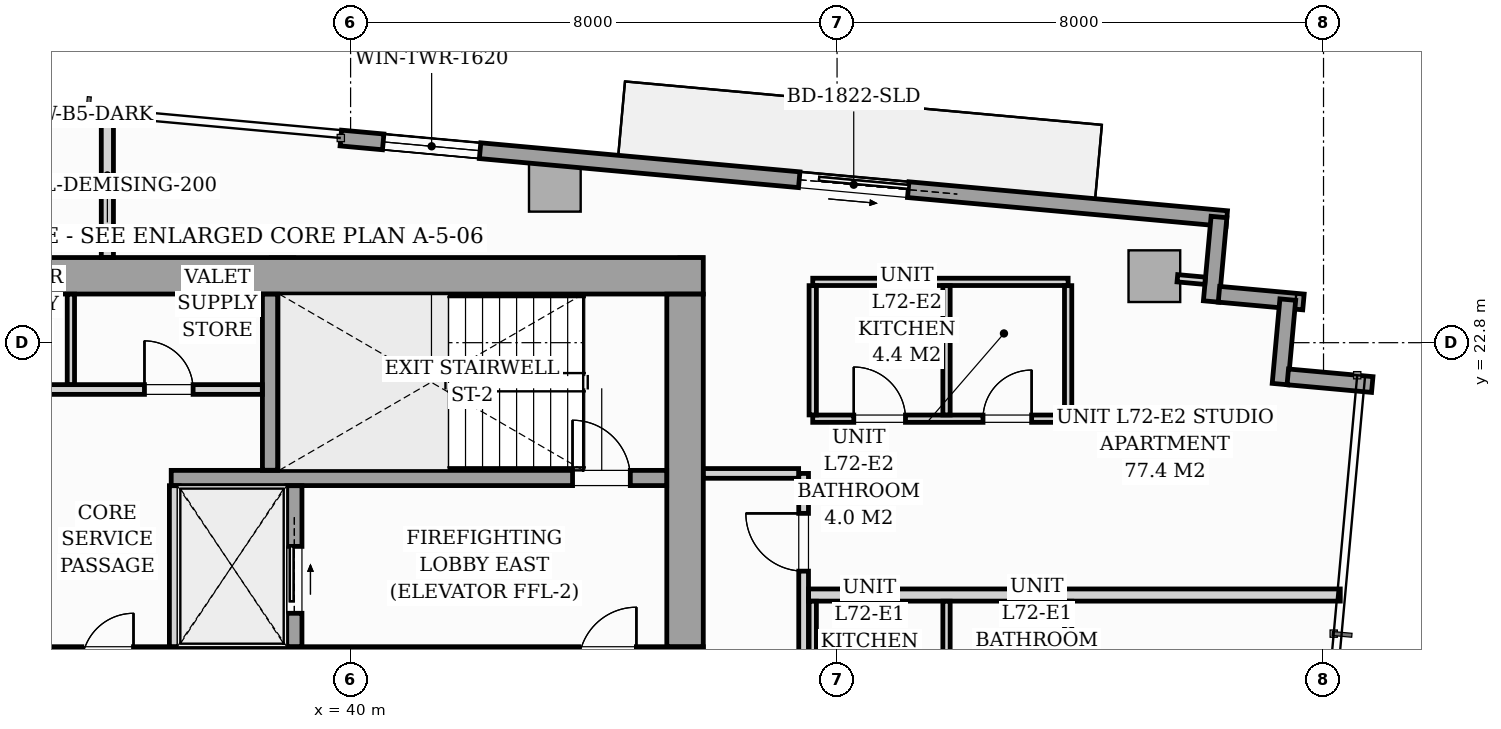
"""IFC4 building model, lengths in metres.
Left out: names, types, materials, properties, quantities, classifications, styles, units other than length and angle.
Written with IfcOpenShell. Run it as: python <this file> out.ifc"""

import sys

from ifc_helpers import new_model, si_unit, direction, frame, frame_2d, origin, origin_2d, place, context, subcontext, project, spatial, rectangle, i_section, extrude, source, transform, mapped, element, fill, save


model = new_model("IFC4")
c1 = context("Model", 3, precision=1e-05, world=origin(), true_north=direction((0.0, 1.0)))
c2 = subcontext(c1, "Body", "Model", "MODEL_VIEW")
j1 = project(units=[si_unit("LENGTHUNIT", "METRE"), si_unit("PLANEANGLEUNIT", "RADIAN")], contexts=[c1])
p1 = place(None, origin())
s1 = spatial("IfcSite", under=j1, at=p1, CompositionType="ELEMENT")
p2 = place(p1, origin())
s2 = spatial("IfcBuilding", under=s1, at=p2, CompositionType="ELEMENT")
p3 = place(p2, frame((0.0, 0.0, 249.6)))
s3 = spatial("IfcBuildingStorey", under=s2, at=p3, CompositionType="ELEMENT", Elevation=249.6)
m1 = source(origin(), c2, "Body", "SweptSolid", [
    extrude(i_section(OverallWidth=0.409, OverallDepth=0.425, WebThickness=0.033, FlangeThickness=0.052, FilletRadius=0.018, at=origin_2d()), origin(), (0.0, 0.0, 1.0), 3.296),
])
for number, where, z_axis, x_axis in (
    (1, (38.88, 24.0, 0.002), (0.0, 0.0, 1.0), (1.0, 0.0, 0.0)),
    (2, (45.6, 24.0, 0.002), (0.0, 0.0, 1.0), (1.0, 0.0, 0.0)),
):
    element("IfcColumn", number, at=place(p3, frame(where, z_axis=z_axis, x_axis=x_axis)), inside=s3, PredefinedType="PILASTER", context=c2, shape_type="MappedRepresentation", body=[
        mapped(m1, transform((0.0, 0.0, 0.0), scale=1.0)),
    ])
m2 = source(origin(), c2, "Body", "SweptSolid", [
    extrude(rectangle(XDim=0.85, YDim=0.85, at=origin_2d()), origin(), (0.0, 0.0, 1.0), 3.296),
])
for number, where, z_axis, x_axis in (
    (3, (43.359, 25.38, 0.002), (0.0, 0.0, 1.0), (0.996, -0.091, 0.0)),
    (4, (53.218, 23.894, 0.002), (0.0, 0.0, 1.0), (0.996, -0.091, 0.0)),
):
    element("IfcColumn", number, at=place(p3, frame(where, z_axis=z_axis, x_axis=x_axis)), inside=s3, PredefinedType="COLUMN", context=c2, shape_type="MappedRepresentation", body=[
        mapped(m2, transform((0.0, 0.0, 0.0), scale=1.0)),
    ])
p4 = place(p3, frame((39.839, 26.166, 0.0), z_axis=(0.0, 0.0, 1.0), x_axis=(0.995884447498, -0.090632043071, 0.0)))
e5 = element("IfcWall", 5, at=p4, inside=s3, PredefinedType="STANDARD", context=c2, shape_type="SweptSolid", body=[
    extrude(rectangle(XDim=14.63, YDim=0.26, at=frame_2d((7.315, 0.0))), origin(), (0.0, 0.0, 1.0), 3.04),
])
p5 = place(p4, frame((7.57, 0.0, 0.0)))
e6 = element("IfcOpeningElement", 6, at=p5, cuts=e5, PredefinedType="OPENING", context=c2, shape_type="SweptSolid", body=[
    extrude(rectangle(XDim=1.8, YDim=2.06, at=frame_2d((0.9, 1.03))), frame((0.0, 0.14, 0.0), z_axis=(0.0, -1.0, 0.0), x_axis=(1.0, 0.0, 0.0)), (0.0, 0.0, 1.0), 0.28),
])
p6 = place(p4, frame((0.7, 0.0, 0.65)))
e7 = element("IfcOpeningElement", 7, at=p6, cuts=e5, PredefinedType="OPENING", context=c2, shape_type="SweptSolid", body=[
    extrude(rectangle(XDim=1.6, YDim=1.5, at=frame_2d((0.8, 0.75))), frame((0.0, 0.14, 0.0), z_axis=(0.0, -1.0, 0.0), x_axis=(1.0, 0.0, 0.0)), (0.0, 0.0, 1.0), 0.28),
])
p7 = place(p3, frame((54.281, 24.866, 0.0), z_axis=(0.0, 0.0, 1.0), x_axis=(-0.090661991521, -0.995881721538, 0.0)))
e8 = element("IfcWall", 8, at=p7, inside=s3, PredefinedType="STANDARD", context=c2, shape_type="SweptSolid", body=[
    extrude(rectangle(XDim=1.395, YDim=0.26, at=frame_2d((0.698, 0.0))), origin(), (0.0, 0.0, 1.0), 3.04),
])
for number, where, z_axis, x_axis in (
    (9, (54.281, 23.596, 0.0), (0.0, 0.0, 1.0), (0.996, -0.091, 0.0)),
    (10, (55.412, 23.508, 0.0), (0.0, 0.0, 1.0), (-0.091, -0.996, 0.0)),
    (11, (55.412, 22.238, 0.0), (0.0, 0.0, 1.0), (0.996, -0.091, 0.0)),
):
    element("IfcWall", number, at=place(p3, frame(where, z_axis=z_axis, x_axis=x_axis)), inside=s3, PredefinedType="STANDARD", context=c2, shape_type="SweptSolid", body=[
        extrude(rectangle(XDim=1.395, YDim=0.26, at=frame_2d((0.698, 0.0))), origin(), (0.0, 0.0, 1.0), 3.04),
    ])
p8 = place(p3, frame((26.2, 17.5, 0.0), z_axis=(0.0, 0.0, 1.0), x_axis=(1.0, 0.0, 0.0)))
e12 = element("IfcWall", 12, at=p8, inside=s3, PredefinedType="SHEAR", context=c2, shape_type="SweptSolid", body=[
    extrude(rectangle(XDim=19.6, YDim=0.6, at=frame_2d((9.8, 0.0))), origin(), (0.0, 0.0, 1.0), 3.3),
])
p9 = place(p8, frame((0.95, 0.0, 0.0)))
e13 = element("IfcOpeningElement", 13, at=p9, cuts=e12, PredefinedType="OPENING", context=c2, shape_type="SweptSolid", body=[
    extrude(rectangle(XDim=0.95, YDim=2.06, at=frame_2d((0.475, 1.03))), frame((0.0, 0.31, 0.0), z_axis=(0.0, -1.0, 0.0), x_axis=(1.0, 0.0, 0.0)), (0.0, 0.0, 1.0), 0.62),
])
p10 = place(p8, frame((9.38, 0.0, 0.0)))
e14 = element("IfcOpeningElement", 14, at=p10, cuts=e12, PredefinedType="OPENING", context=c2, shape_type="SweptSolid", body=[
    extrude(rectangle(XDim=0.85, YDim=2.0, at=frame_2d((0.425, 1.0))), frame((0.0, 0.31, 0.0), z_axis=(0.0, -1.0, 0.0), x_axis=(1.0, 0.0, 0.0)), (0.0, 0.0, 1.0), 0.62),
])
p11 = place(p8, frame((17.55, 0.0, 0.0)))
e15 = element("IfcOpeningElement", 15, at=p11, cuts=e12, PredefinedType="OPENING", context=c2, shape_type="SweptSolid", body=[
    extrude(rectangle(XDim=0.95, YDim=2.06, at=frame_2d((0.475, 1.03))), frame((0.0, 0.31, 0.0), z_axis=(0.0, -1.0, 0.0), x_axis=(1.0, 0.0, 0.0)), (0.0, 0.0, 1.0), 0.62),
])
p12 = place(p3, frame((26.2, 23.9, 0.0), z_axis=(0.0, 0.0, 1.0), x_axis=(1.0, 0.0, 0.0)))
e16 = element("IfcWall", 16, at=p12, inside=s3, PredefinedType="SHEAR", context=c2, shape_type="SweptSolid", body=[
    extrude(rectangle(XDim=19.6, YDim=0.6, at=frame_2d((9.8, 0.0))), origin(), (0.0, 0.0, 1.0), 3.3),
])
p13 = place(p3, frame((45.5, 17.802, 0.0), z_axis=(0.0, 0.0, 1.0), x_axis=(0.0, 1.0, 0.0)))
e17 = element("IfcWall", 17, at=p13, inside=s3, PredefinedType="SHEAR", context=c2, shape_type="SweptSolid", body=[
    extrude(rectangle(XDim=5.796, YDim=0.6, at=frame_2d((2.898, 0.0))), origin(), (0.0, 0.0, 1.0), 3.3),
])
p14 = place(p3, frame((37.05, 20.575, 0.0), z_axis=(0.0, 0.0, 1.0), x_axis=(1.0, 0.0, 0.0)))
e18 = element("IfcWall", 18, at=p14, inside=s3, PredefinedType="SOLIDWALL", context=c2, shape_type="SweptSolid", body=[
    extrude(rectangle(XDim=8.148, YDim=0.25, at=frame_2d((4.074, 0.0))), origin(), (0.0, 0.0, 1.0), 3.3),
])
p15 = place(p14, frame((6.6, 0.0, 0.0)))
e19 = element("IfcOpeningElement", 19, at=p15, cuts=e18, PredefinedType="OPENING", context=c2, shape_type="SweptSolid", body=[
    extrude(rectangle(XDim=0.95, YDim=2.06, at=frame_2d((0.475, 1.03))), frame((0.0, 0.135, 0.0), z_axis=(0.0, -1.0, 0.0), x_axis=(1.0, 0.0, 0.0)), (0.0, 0.0, 1.0), 0.27),
])
p16 = place(p3, frame((38.675, 20.702, 0.0), z_axis=(0.0, 0.0, 1.0), x_axis=(0.0, 1.0, 0.0)))
e20 = element("IfcWall", 20, at=p16, inside=s3, PredefinedType="SOLIDWALL", context=c2, shape_type="SweptSolid", body=[
    extrude(rectangle(XDim=2.896, YDim=0.25, at=frame_2d((1.448, 0.0))), origin(), (0.0, 0.0, 1.0), 3.3),
])
p17 = place(p3, frame((37.1, 17.802, 0.0), z_axis=(0.0, 0.0, 1.0), x_axis=(0.0, 1.0, 0.0)))
e21 = element("IfcWall", 21, at=p17, inside=s3, PredefinedType="PARTITIONING", context=c2, shape_type="SweptSolid", body=[
    extrude(rectangle(XDim=2.646, YDim=0.16, at=frame_2d((1.323, 0.0))), origin(), (0.0, 0.0, 1.0), 3.04),
])
p18 = place(p3, frame((39.075, 17.802, 0.0), z_axis=(0.0, 0.0, 1.0), x_axis=(0.0, 1.0, 0.0)))
e22 = element("IfcWall", 22, at=p18, inside=s3, PredefinedType="SOLIDWALL", context=c2, shape_type="SweptSolid", body=[
    extrude(rectangle(XDim=2.646, YDim=0.25, at=frame_2d((1.323, 0.0))), origin(), (0.0, 0.0, 1.0), 3.3),
])
p19 = place(p18, frame((0.548, 0.0, 0.0)))
e23 = element("IfcOpeningElement", 23, at=p19, cuts=e22, PredefinedType="OPENING", context=c2, shape_type="SweptSolid", body=[
    extrude(rectangle(XDim=1.1, YDim=2.08, at=frame_2d((0.55, 1.04))), frame((0.0, 0.135, 0.0), z_axis=(0.0, -1.0, 0.0), x_axis=(1.0, 0.0, 0.0)), (0.0, 0.0, 1.0), 0.27),
])
p20 = place(p3, frame((33.452, 22.03, 0.0), z_axis=(0.0, 0.0, 1.0), x_axis=(1.0, 0.0, 0.0)))
e24 = element("IfcWall", 24, at=p20, inside=s3, PredefinedType="PARTITIONING", context=c2, shape_type="SweptSolid", body=[
    extrude(rectangle(XDim=5.096, YDim=0.16, at=frame_2d((2.548, 0.0))), origin(), (0.0, 0.0, 1.0), 3.04),
])
p21 = place(p20, frame((0.538, 0.0, 0.0)))
e25 = element("IfcOpeningElement", 25, at=p21, cuts=e24, PredefinedType="OPENING", context=c2, shape_type="SweptSolid", body=[
    extrude(rectangle(XDim=0.8, YDim=2.05, at=frame_2d((0.4, 1.025))), frame((0.0, 0.09, 0.0), z_axis=(0.0, -1.0, 0.0), x_axis=(1.0, 0.0, 0.0)), (0.0, 0.0, 1.0), 0.18),
])
p22 = place(p20, frame((3.158, 0.0, 0.0)))
e26 = element("IfcOpeningElement", 26, at=p22, cuts=e24, PredefinedType="OPENING", context=c2, shape_type="SweptSolid", body=[
    extrude(rectangle(XDim=0.8, YDim=2.05, at=frame_2d((0.4, 1.025))), frame((0.0, 0.09, 0.0), z_axis=(0.0, -1.0, 0.0), x_axis=(1.0, 0.0, 0.0)), (0.0, 0.0, 1.0), 0.18),
])
p23 = place(p3, frame((35.4, 22.112, 0.0), z_axis=(0.0, 0.0, 1.0), x_axis=(0.0, 1.0, 0.0)))
e27 = element("IfcWall", 27, at=p23, inside=s3, PredefinedType="PARTITIONING", context=c2, shape_type="SweptSolid", body=[
    extrude(rectangle(XDim=1.486, YDim=0.12, at=frame_2d((0.743, 0.0))), origin(), (0.0, 0.0, 1.0), 3.04),
])
p24 = place(p3, frame((47.45, 13.362, 0.0), z_axis=(0.0, 0.0, 1.0), x_axis=(0.0, 1.0, 0.0)))
e28 = element("IfcWall", 28, at=p24, inside=s3, PredefinedType="PARTITIONING", context=c2, shape_type="SweptSolid", body=[
    extrude(rectangle(XDim=7.288, YDim=0.16, at=frame_2d((3.644, 0.0))), origin(), (0.0, 0.0, 1.0), 3.04),
])
p25 = place(p24, frame((0.493, 0.0, 0.0)))
e29 = element("IfcOpeningElement", 29, at=p25, cuts=e28, PredefinedType="OPENING", context=c2, shape_type="SweptSolid", body=[
    extrude(rectangle(XDim=0.95, YDim=2.06, at=frame_2d((0.475, 1.03))), frame((0.0, 0.09, 0.0), z_axis=(0.0, -1.0, 0.0), x_axis=(1.0, 0.0, 0.0)), (0.0, 0.0, 1.0), 0.18),
])
p26 = place(p24, frame((5.681, 0.0, 0.0)))
e30 = element("IfcOpeningElement", 30, at=p26, cuts=e28, PredefinedType="OPENING", context=c2, shape_type="SweptSolid", body=[
    extrude(rectangle(XDim=0.95, YDim=2.06, at=frame_2d((0.475, 1.03))), frame((0.0, 0.09, 0.0), z_axis=(0.0, -1.0, 0.0), x_axis=(1.0, 0.0, 0.0)), (0.0, 0.0, 1.0), 0.18),
])
p27 = place(p3, frame((36.0, 24.202, 0.0), z_axis=(0.0, 0.0, 1.0), x_axis=(0.0, 1.0, 0.0)))
e31 = element("IfcWall", 31, at=p27, inside=s3, PredefinedType="PARTITIONING", context=c2, shape_type="SweptSolid", body=[
    extrude(rectangle(XDim=2.363, YDim=0.2, at=frame_2d((1.182, 0.0))), origin(), (0.0, 0.0, 1.0), 3.04),
])
p28 = place(p3, frame((45.802, 20.65, 0.0), z_axis=(0.0, 0.0, 1.0), x_axis=(1.0, 0.0, 0.0)))
e32 = element("IfcWall", 32, at=p28, inside=s3, PredefinedType="PARTITIONING", context=c2, shape_type="SweptSolid", body=[
    extrude(rectangle(XDim=1.566, YDim=0.16, at=frame_2d((0.783, 0.0))), origin(), (0.0, 0.0, 1.0), 3.04),
])
p29 = place(p3, frame((47.532, 18.65, 0.0), z_axis=(0.0, 0.0, 1.0), x_axis=(1.0, 0.0, 0.0)))
e33 = element("IfcWall", 33, at=p29, inside=s3, PredefinedType="PARTITIONING", context=c2, shape_type="SweptSolid", body=[
    extrude(rectangle(XDim=8.743, YDim=0.2, at=frame_2d((4.372, 0.0))), origin(), (0.0, 0.0, 1.0), 3.04),
])
for number, where, z_axis, x_axis in (
    (34, (47.6, 16.362, 0.0), (0.0, 0.0, 1.0), (0.0, 1.0, 0.0)),
    (35, (49.8, 16.362, 0.0), (0.0, 0.0, 1.0), (0.0, 1.0, 0.0)),
    (36, (51.8, 16.362, 0.0), (0.0, 0.0, 1.0), (0.0, 1.0, 0.0)),
):
    element("IfcWall", number, at=place(p3, frame(where, z_axis=z_axis, x_axis=x_axis)), inside=s3, PredefinedType="PARTITIONING", context=c2, shape_type="SweptSolid", body=[
        extrude(rectangle(XDim=2.186, YDim=0.12, at=frame_2d((1.093, 0.0))), origin(), (0.0, 0.0, 1.0), 3.04),
    ])
p30 = place(p3, frame((47.6, 21.55, 0.0), z_axis=(0.0, 0.0, 1.0), x_axis=(1.0, 0.0, 0.0)))
e37 = element("IfcWall", 37, at=p30, inside=s3, PredefinedType="PARTITIONING", context=c2, shape_type="SweptSolid", body=[
    extrude(rectangle(XDim=4.2, YDim=0.12, at=frame_2d((2.1, 0.0))), origin(), (0.0, 0.0, 1.0), 3.04),
])
p31 = place(p30, frame((0.675, 0.0, 0.0)))
e38 = element("IfcOpeningElement", 38, at=p31, cuts=e37, PredefinedType="OPENING", context=c2, shape_type="SweptSolid", body=[
    extrude(rectangle(XDim=0.85, YDim=2.05, at=frame_2d((0.425, 1.025))), frame((0.0, 0.07, 0.0), z_axis=(0.0, -1.0, 0.0), x_axis=(1.0, 0.0, 0.0)), (0.0, 0.0, 1.0), 0.14),
])
p32 = place(p30, frame((2.8, 0.0, 0.0)))
e39 = element("IfcOpeningElement", 39, at=p32, cuts=e37, PredefinedType="OPENING", context=c2, shape_type="SweptSolid", body=[
    extrude(rectangle(XDim=0.8, YDim=2.02, at=frame_2d((0.4, 1.01))), frame((0.0, 0.07, 0.0), z_axis=(0.0, -1.0, 0.0), x_axis=(1.0, 0.0, 0.0)), (0.0, 0.0, 1.0), 0.14),
])
p33 = place(p3, frame((47.6, 23.8, 0.0), z_axis=(0.0, 0.0, 1.0), x_axis=(1.0, 0.0, 0.0)))
e40 = element("IfcWall", 40, at=p33, inside=s3, PredefinedType="PARTITIONING", context=c2, shape_type="SweptSolid", body=[
    extrude(rectangle(XDim=4.2, YDim=0.12, at=frame_2d((2.1, 0.0))), origin(), (0.0, 0.0, 1.0), 3.04),
])
for number, where, z_axis, x_axis in (
    (41, (47.6, 21.612, 0.0), (0.0, 0.0, 1.0), (0.0, 1.0, 0.0)),
    (42, (49.8, 21.612, 0.0), (0.0, 0.0, 1.0), (0.0, 1.0, 0.0)),
    (43, (51.8, 21.612, 0.0), (0.0, 0.0, 1.0), (0.0, 1.0, 0.0)),
):
    element("IfcWall", number, at=place(p3, frame(where, z_axis=z_axis, x_axis=x_axis)), inside=s3, PredefinedType="PARTITIONING", context=c2, shape_type="SweptSolid", body=[
        extrude(rectangle(XDim=2.126, YDim=0.12, at=frame_2d((1.063, 0.0))), origin(), (0.0, 0.0, 1.0), 3.04),
    ])
p34 = place(p3, frame((53.597, 23.859, 0.0), z_axis=(0.0, 0.0, 1.0), x_axis=(0.995884462012, -0.090631883588, 0.0)))
e44 = element("IfcWall", 44, at=p34, inside=s3, PredefinedType="PARTITIONING", context=c2, shape_type="SweptSolid", body=[
    extrude(rectangle(XDim=0.458, YDim=0.12, at=frame_2d((0.229, 0.0))), origin(), (0.0, 0.0, 1.0), 3.04),
])
m3 = source(origin(), c2, "Body", "SweptSolid", [
    extrude(rectangle(XDim=1.8, YDim=2.06, at=frame_2d((0.9, 1.03))), frame((0.0, 0.025, 0.0), z_axis=(0.0, -1.0, 0.0), x_axis=(1.0, 0.0, 0.0)), (0.0, 0.0, 1.0), 0.05),
])
p35 = place(p5, origin())
e45 = element("IfcDoor", 45, at=p35, inside=s3, OperationType="SLIDING_TO_RIGHT", PredefinedType="DOOR", context=c2, shape_type="MappedRepresentation", body=[
    mapped(m3, transform((0.0, 0.0, 0.0), scale=1.0)),
])
fill(e6, e45)
m4 = source(origin(), c2, "Body", "SweptSolid", [
    extrude(rectangle(XDim=1.6, YDim=1.5, at=frame_2d((0.8, 0.75))), frame((0.0, 0.03, 0.0), z_axis=(0.0, -1.0, 0.0), x_axis=(1.0, 0.0, 0.0)), (0.0, 0.0, 1.0), 0.06),
])
p36 = place(p6, origin())
e46 = element("IfcWindow", 46, at=p36, inside=s3, PartitioningType="SINGLE_PANEL", PredefinedType="WINDOW", context=c2, shape_type="MappedRepresentation", body=[
    mapped(m4, transform((0.0, 0.0, 0.0), scale=1.0)),
])
fill(e7, e46)
m5 = source(origin(), c2, "Body", "SweptSolid", [
    extrude(rectangle(XDim=0.95, YDim=2.06, at=frame_2d((0.475, 1.03))), frame((0.0, 0.025, 0.0), z_axis=(0.0, -1.0, 0.0), x_axis=(1.0, 0.0, 0.0)), (0.0, 0.0, 1.0), 0.05),
])
p37 = place(p15, origin())
e47 = element("IfcDoor", 47, at=p37, inside=s3, OperationType="SINGLE_SWING_LEFT", PredefinedType="DOOR", context=c2, shape_type="MappedRepresentation", body=[
    mapped(m5, transform((0.0, 0.0, 0.0), scale=1.0)),
])
fill(e19, e47)
m6 = source(origin(), c2, "Body", "SweptSolid", [
    extrude(rectangle(XDim=1.1, YDim=2.08, at=frame_2d((0.55, 1.04))), frame((0.0, 0.025, 0.0), z_axis=(0.0, -1.0, 0.0), x_axis=(1.0, 0.0, 0.0)), (0.0, 0.0, 1.0), 0.05),
])
p38 = place(p19, origin())
e48 = element("IfcDoor", 48, at=p38, inside=s3, OperationType="SLIDING_TO_RIGHT", PredefinedType="DOOR", context=c2, shape_type="MappedRepresentation", body=[
    mapped(m6, transform((0.0, 0.0, 0.0), scale=1.0)),
])
fill(e23, e48)
m7 = source(origin(), c2, "Body", "SweptSolid", [
    extrude(rectangle(XDim=0.8, YDim=2.05, at=frame_2d((0.4, 1.025))), frame((0.0, 0.025, 0.0), z_axis=(0.0, -1.0, 0.0), x_axis=(1.0, 0.0, 0.0)), (0.0, 0.0, 1.0), 0.05),
])
p39 = place(p22, origin())
e49 = element("IfcDoor", 49, at=p39, inside=s3, OperationType="SINGLE_SWING_LEFT", PredefinedType="DOOR", context=c2, shape_type="MappedRepresentation", body=[
    mapped(m7, transform((0.0, 0.0, 0.0), scale=1.0)),
])
fill(e26, e49)
m8 = source(origin(), c2, "Body", "SweptSolid", [
    extrude(rectangle(XDim=0.95, YDim=2.06, at=frame_2d((0.475, 1.03))), frame((0.0, 0.025, 0.0), z_axis=(0.0, -1.0, 0.0), x_axis=(1.0, 0.0, 0.0)), (0.0, 0.0, 1.0), 0.05),
])
p40 = place(p26, origin())
e50 = element("IfcDoor", 50, at=p40, inside=s3, OperationType="SINGLE_SWING_RIGHT", PredefinedType="DOOR", context=c2, shape_type="MappedRepresentation", body=[
    mapped(m8, transform((0.0, 0.0, 0.0), scale=1.0)),
])
fill(e30, e50)
m9 = source(origin(), c2, "Body", "SweptSolid", [
    extrude(rectangle(XDim=0.85, YDim=2.05, at=frame_2d((0.425, 1.025))), frame((0.0, 0.025, 0.0), z_axis=(0.0, -1.0, 0.0), x_axis=(1.0, 0.0, 0.0)), (0.0, 0.0, 1.0), 0.05),
])
p41 = place(p31, origin())
e51 = element("IfcDoor", 51, at=p41, inside=s3, OperationType="SINGLE_SWING_LEFT", PredefinedType="DOOR", context=c2, shape_type="MappedRepresentation", body=[
    mapped(m9, transform((0.0, 0.0, 0.0), scale=1.0)),
])
fill(e38, e51)
m10 = source(origin(), c2, "Body", "SweptSolid", [
    extrude(rectangle(XDim=0.8, YDim=2.02, at=frame_2d((0.4, 1.01))), frame((0.0, 0.025, 0.0), z_axis=(0.0, -1.0, 0.0), x_axis=(1.0, 0.0, 0.0)), (0.0, 0.0, 1.0), 0.05),
])
p42 = place(p32, origin())
e52 = element("IfcDoor", 52, at=p42, inside=s3, OperationType="SINGLE_SWING_RIGHT", PredefinedType="DOOR", context=c2, shape_type="MappedRepresentation", body=[
    mapped(m10, transform((0.0, 0.0, 0.0), scale=1.0)),
])
fill(e39, e52)
save(model, sys.argv[1])
